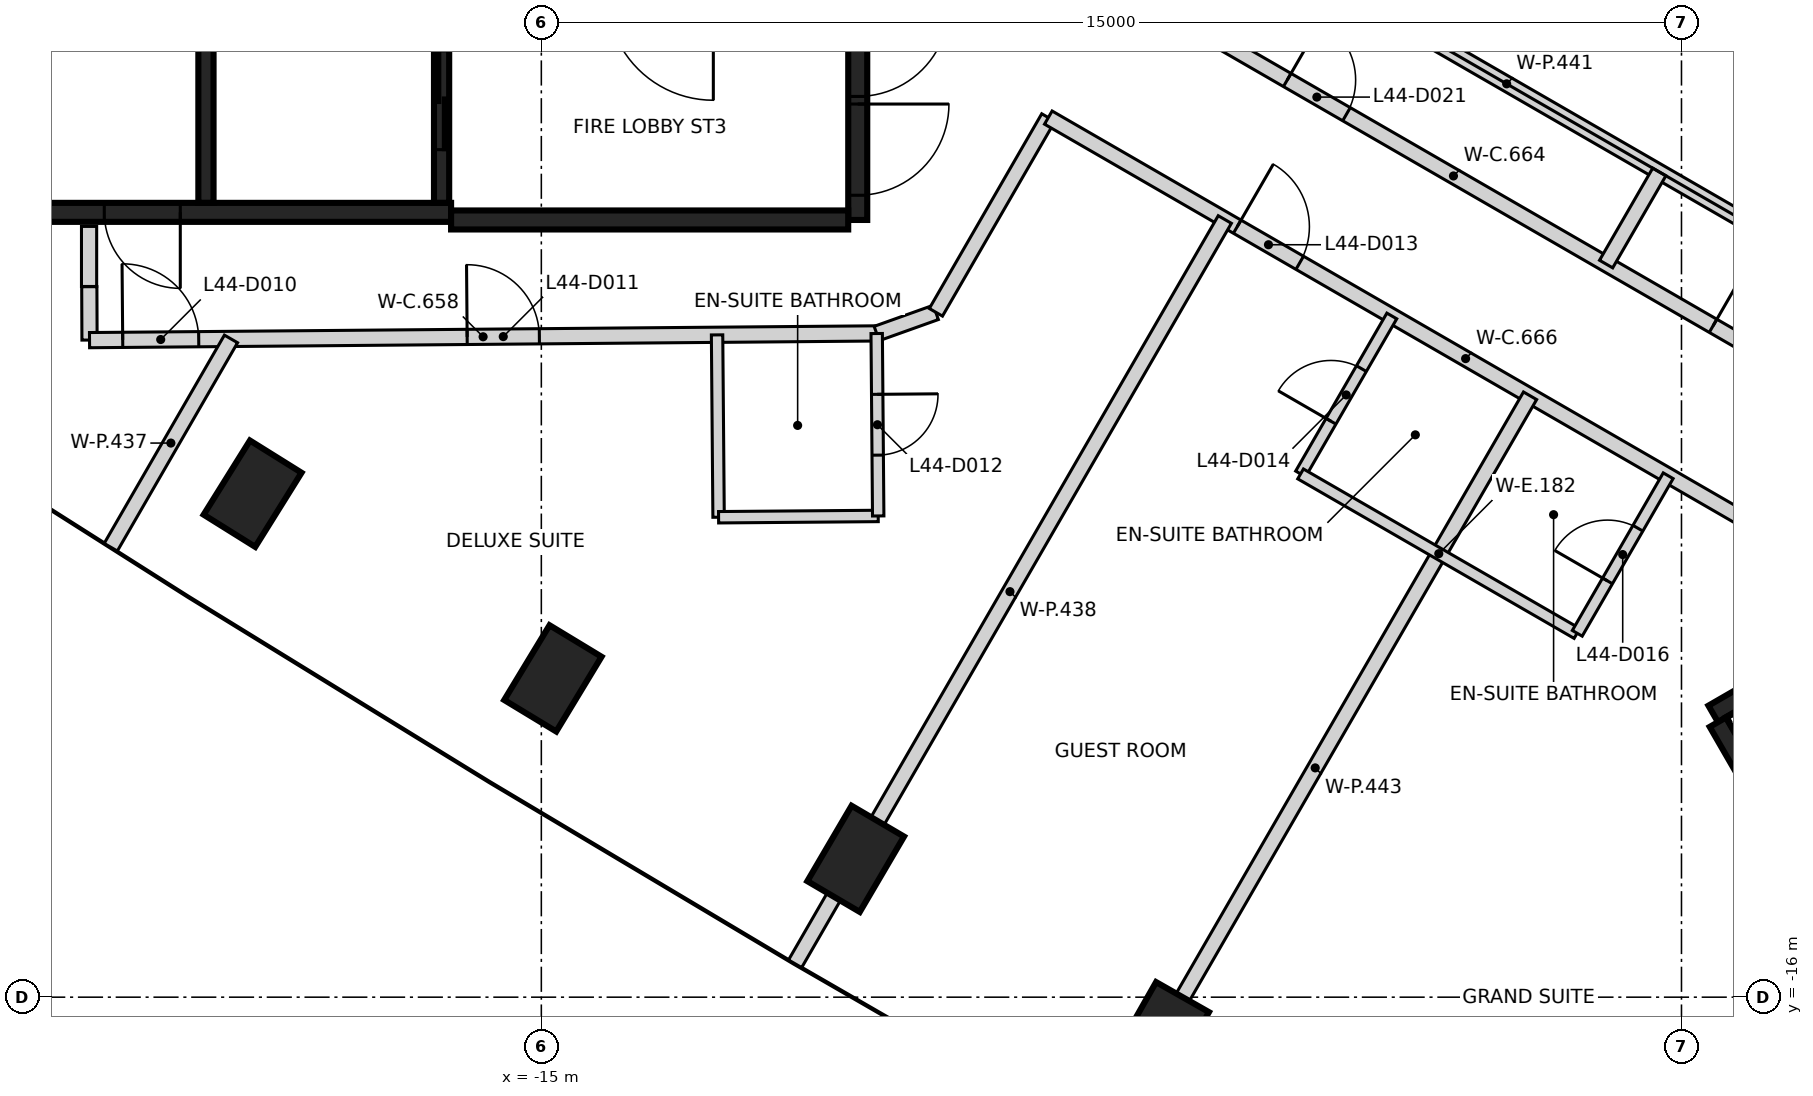
"""IFC4 building model, lengths in metres.
Left out: names, types, materials, properties, quantities, classifications, styles, units other than length and angle.
Written with IfcOpenShell. Run it as: python <this file> out.ifc"""

import sys

from ifc_helpers import new_model, si_unit, direction, frame, frame_2d, origin, origin_2d, place, context, subcontext, project, spatial, rectangle, extrude, element, fill, save


model = new_model("IFC4")
c1 = context("Model", 3, precision=1e-05, world=origin(), true_north=direction((0.0, 1.0)))
c2 = subcontext(c1, "Body", "Model", "MODEL_VIEW")
j1 = project(units=[si_unit("LENGTHUNIT", "METRE"), si_unit("PLANEANGLEUNIT", "RADIAN")], contexts=[c1])
p1 = place(None, origin())
s1 = spatial("IfcSite", under=j1, at=p1, CompositionType="ELEMENT")
p2 = place(p1, origin())
s2 = spatial("IfcBuilding", under=s1, at=p2, CompositionType="ELEMENT")
p3 = place(p2, frame((0.0, 0.0, 179.2)))
s3 = spatial("IfcBuildingStorey", under=s2, at=p3, CompositionType="ELEMENT", Elevation=179.2)
for number, where, z_axis, x_axis in (
    (1, (-18.799, -9.376, -0.35), (0.0, 0.0, 1.0), (0.529, 0.848, 0.0)),
    (2, (-14.848, -11.806, -0.35), (0.0, 0.0, 1.0), (0.518, 0.855, 0.0)),
    (3, (-10.864, -14.18, -0.35), (0.0, 0.0, 1.0), (0.506, 0.862, 0.0)),
    (4, (-6.848, -16.499, -0.35), (0.0, 0.0, 1.0), (0.494, 0.87, 0.0)),
):
    element("IfcColumn", number, at=place(p3, frame(where, z_axis=z_axis, x_axis=x_axis)), inside=s3, PredefinedType="COLUMN", context=c2, shape_type="SweptSolid", body=[
        extrude(rectangle(XDim=1.15, YDim=0.8, at=origin_2d()), origin(), (0.0, 0.0, 1.0), 3.6),
    ])
p4 = place(p3, frame((-10.837, 5.775, 0.0), z_axis=(0.0, 0.0, 1.0), x_axis=(0.0, -1.0, 0.0)))
e5 = element("IfcWall", 5, at=p4, inside=s3, PredefinedType="SHEAR", context=c2, shape_type="SweptSolid", body=[
    extrude(rectangle(XDim=11.55, YDim=0.25, at=frame_2d((5.775, 0.0))), origin(), (0.0, 0.0, 1.0), 3.25),
])
p5 = place(p4, frame((10.025, 0.0, 0.0)))
e6 = element("IfcOpeningElement", 6, at=p5, cuts=e5, PredefinedType="OPENING", context=c2, shape_type="SweptSolid", body=[
    extrude(rectangle(XDim=1.2, YDim=2.1, at=frame_2d((0.6, 1.05))), frame((0.0, 0.135, 0.0), z_axis=(0.0, -1.0, 0.0), x_axis=(1.0, 0.0, 0.0)), (0.0, 0.0, 1.0), 0.27),
])
p6 = place(p4, frame((8.725, 0.0, 0.0)))
e7 = element("IfcOpeningElement", 7, at=p6, cuts=e5, PredefinedType="OPENING", context=c2, shape_type="SweptSolid", body=[
    extrude(rectangle(XDim=1.2, YDim=2.1, at=frame_2d((0.6, 1.05))), frame((0.0, 0.135, 0.0), z_axis=(0.0, -1.0, 0.0), x_axis=(1.0, 0.0, 0.0)), (0.0, 0.0, 1.0), 0.27),
])
p7 = place(p3, frame((-16.187, -5.675, 0.0), z_axis=(0.0, 0.0, 1.0), x_axis=(-1.0, 0.0, 0.0)))
e8 = element("IfcWall", 8, at=p7, inside=s3, PredefinedType="SHEAR", context=c2, shape_type="SweptSolid", body=[
    extrude(rectangle(XDim=6.25, YDim=0.25, at=frame_2d((3.125, 0.0))), origin(), (0.0, 0.0, 1.0), 3.25),
])
p8 = place(p7, frame((3.563, 0.0, 0.0)))
e9 = element("IfcOpeningElement", 9, at=p8, cuts=e8, PredefinedType="OPENING", context=c2, shape_type="SweptSolid", body=[
    extrude(rectangle(XDim=1.0, YDim=2.1, at=frame_2d((0.5, 1.05))), frame((0.0, 0.135, 0.0), z_axis=(0.0, -1.0, 0.0), x_axis=(1.0, 0.0, 0.0)), (0.0, 0.0, 1.0), 0.27),
])
p9 = place(p3, frame((-10.963, -5.775, 0.0), z_axis=(0.0, 0.0, 1.0), x_axis=(-1.0, 0.0, 0.0)))
e10 = element("IfcWall", 10, at=p9, inside=s3, PredefinedType="SHEAR", context=c2, shape_type="SweptSolid", body=[
    extrude(rectangle(XDim=5.225, YDim=0.25, at=frame_2d((2.612, 0.0))), origin(), (0.0, 0.0, 1.0), 3.25),
])
p10 = place(p3, frame((-16.312, -2.898, 0.0), z_axis=(0.0, 0.0, 1.0), x_axis=(0.0, -1.0, 0.0)))
e11 = element("IfcWall", 11, at=p10, inside=s3, PredefinedType="SHEAR", context=c2, shape_type="SweptSolid", body=[
    extrude(rectangle(XDim=2.651, YDim=0.2, at=frame_2d((1.325, 0.0))), origin(), (0.0, 0.0, 1.0), 3.25),
])
p11 = place(p10, frame((0.652, 0.0, 0.0)))
e12 = element("IfcOpeningElement", 12, at=p11, cuts=e11, PredefinedType="OPENING", context=c2, shape_type="SweptSolid", body=[
    extrude(rectangle(XDim=1.3, YDim=2.1, at=frame_2d((0.65, 1.05))), frame((0.0, 0.11, 0.0), z_axis=(0.0, -1.0, 0.0), x_axis=(1.0, 0.0, 0.0)), (0.0, 0.0, 1.0), 0.22),
])
p12 = place(p3, frame((-19.412, -5.549, 0.0), z_axis=(0.0, 0.0, 1.0), x_axis=(0.0, 1.0, 0.0)))
e13 = element("IfcWall", 13, at=p12, inside=s3, PredefinedType="SHEAR", context=c2, shape_type="SweptSolid", body=[
    extrude(rectangle(XDim=2.651, YDim=0.2, at=frame_2d((1.325, 0.0))), origin(), (0.0, 0.0, 1.0), 3.25),
])
p13 = place(p3, frame((0.417, -12.273, 0.0), z_axis=(0.0, 0.0, 1.0), x_axis=(0.866021906294, 0.500006057782, 0.0)))
e14 = element("IfcWall", 14, at=p13, inside=s3, PredefinedType="SHEAR", context=c2, shape_type="SweptSolid", body=[
    extrude(rectangle(XDim=11.55, YDim=0.25, at=frame_2d((5.775, 0.0))), origin(), (0.0, 0.0, 1.0), 3.25),
])
p14 = place(p13, frame((10.025, 0.0, 0.0)))
e15 = element("IfcOpeningElement", 15, at=p14, cuts=e14, PredefinedType="OPENING", context=c2, shape_type="SweptSolid", body=[
    extrude(rectangle(XDim=1.2, YDim=2.1, at=frame_2d((0.6, 1.05))), frame((0.0, 0.135, 0.0), z_axis=(0.0, -1.0, 0.0), x_axis=(1.0, 0.0, 0.0)), (0.0, 0.0, 1.0), 0.27),
])
p15 = place(p13, frame((8.725, 0.0, 0.0)))
e16 = element("IfcOpeningElement", 16, at=p15, cuts=e14, PredefinedType="OPENING", context=c2, shape_type="SweptSolid", body=[
    extrude(rectangle(XDim=1.2, YDim=2.1, at=frame_2d((0.6, 1.05))), frame((0.0, 0.135, 0.0), z_axis=(0.0, -1.0, 0.0), x_axis=(1.0, 0.0, 0.0)), (0.0, 0.0, 1.0), 0.27),
])
p16 = place(p3, frame((3.235, -17.153, 0.0), z_axis=(0.0, 0.0, 1.0), x_axis=(-0.500008851346, 0.866020293397, 0.0)))
e17 = element("IfcWall", 17, at=p16, inside=s3, PredefinedType="SHEAR", context=c2, shape_type="SweptSolid", body=[
    extrude(rectangle(XDim=5.51, YDim=0.25, at=frame_2d((2.755, 0.0))), origin(), (0.0, 0.0, 1.0), 3.25),
])
p17 = place(p3, frame((-20.95, -6.65, 0.0), z_axis=(0.0, 0.0, 1.0), x_axis=(0.0, 1.0, 0.0)))
e18 = element("IfcWall", 18, at=p17, inside=s3, PredefinedType="PARTITIONING", context=c2, shape_type="SweptSolid", body=[
    extrude(rectangle(XDim=0.79, YDim=0.2, at=frame_2d((0.395, 0.0))), origin(), (0.0, 0.0, 1.0), 3.25),
])
p18 = place(p3, frame((-20.947, -6.653, 0.0), z_axis=(0.0, 0.0, 1.0), x_axis=(0.004173876686, -0.999991289339, 0.0)))
e19 = element("IfcWall", 19, at=p18, inside=s3, PredefinedType="PARTITIONING", context=c2, shape_type="SweptSolid", body=[
    extrude(rectangle(XDim=0.702, YDim=0.2, at=frame_2d((0.351, 0.0))), origin(), (0.0, 0.0, 1.0), 3.25),
])
p19 = place(p3, frame((-20.944, -7.356, 0.0), z_axis=(0.0, 0.0, 1.0), x_axis=(0.999963588164, 0.008533600955, 0.0)))
e20 = element("IfcWall", 20, at=p19, inside=s3, PredefinedType="PARTITIONING", context=c2, shape_type="SweptSolid", body=[
    extrude(rectangle(XDim=10.357, YDim=0.2, at=frame_2d((5.178, 0.0))), origin(), (0.0, 0.0, 1.0), 3.25),
])
p20 = place(p19, frame((0.437, 0.0, 0.0)))
e21 = element("IfcOpeningElement", 21, at=p20, cuts=e20, PredefinedType="OPENING", context=c2, shape_type="SweptSolid", body=[
    extrude(rectangle(XDim=1.0, YDim=2.1, at=frame_2d((0.5, 1.05))), frame((0.0, 0.11, 0.0), z_axis=(0.0, -1.0, 0.0), x_axis=(1.0, 0.0, 0.0)), (0.0, 0.0, 1.0), 0.22),
])
p21 = place(p19, frame((4.968, 0.0, 0.0)))
e22 = element("IfcOpeningElement", 22, at=p21, cuts=e20, PredefinedType="OPENING", context=c2, shape_type="SweptSolid", body=[
    extrude(rectangle(XDim=0.95, YDim=2.1, at=frame_2d((0.475, 1.05))), frame((0.0, 0.11, 0.0), z_axis=(0.0, -1.0, 0.0), x_axis=(1.0, 0.0, 0.0)), (0.0, 0.0, 1.0), 0.22),
])
p22 = place(p3, frame((-10.588, -7.269, 0.0), z_axis=(0.0, 0.0, 1.0), x_axis=(0.941634876095, 0.336635945974, 0.0)))
e23 = element("IfcWall", 23, at=p22, inside=s3, PredefinedType="PARTITIONING", context=c2, shape_type="SweptSolid", body=[
    extrude(rectangle(XDim=0.826, YDim=0.2, at=frame_2d((0.413, 0.0))), origin(), (0.0, 0.0, 1.0), 3.25),
])
p23 = place(p3, frame((-9.809, -6.99, 0.0), z_axis=(0.0, 0.0, 1.0), x_axis=(0.499955822529, 0.866050908157, 0.0)))
e24 = element("IfcWall", 24, at=p23, inside=s3, PredefinedType="PARTITIONING", context=c2, shape_type="SweptSolid", body=[
    extrude(rectangle(XDim=2.958, YDim=0.2, at=frame_2d((1.479, 0.0))), origin(), (0.0, 0.0, 1.0), 3.25),
])
p24 = place(p3, frame((-8.612, -1.956, 0.0), z_axis=(0.0, 0.0, 1.0), x_axis=(0.866034386606, -0.499984440973, 0.0)))
e25 = element("IfcWall", 25, at=p24, inside=s3, PredefinedType="PARTITIONING", context=c2, shape_type="SweptSolid", body=[
    extrude(rectangle(XDim=12.96, YDim=0.2, at=frame_2d((6.48, 0.0))), origin(), (0.0, 0.0, 1.0), 3.25),
])
p25 = place(p24, frame((3.955, 0.0, 0.0)))
e26 = element("IfcOpeningElement", 26, at=p25, cuts=e25, PredefinedType="OPENING", context=c2, shape_type="SweptSolid", body=[
    extrude(rectangle(XDim=0.9, YDim=2.1, at=frame_2d((0.45, 1.05))), frame((0.0, 0.11, 0.0), z_axis=(0.0, -1.0, 0.0), x_axis=(1.0, 0.0, 0.0)), (0.0, 0.0, 1.0), 0.22),
])
p26 = place(p24, frame((10.424, 0.0, 0.0)))
e27 = element("IfcOpeningElement", 27, at=p26, cuts=e25, PredefinedType="OPENING", context=c2, shape_type="SweptSolid", body=[
    extrude(rectangle(XDim=0.9, YDim=2.1, at=frame_2d((0.45, 1.05))), frame((0.0, 0.11, 0.0), z_axis=(0.0, -1.0, 0.0), x_axis=(1.0, 0.0, 0.0)), (0.0, 0.0, 1.0), 0.22),
])
p27 = place(p3, frame((-8.33, -4.428, 0.0), z_axis=(0.0, 0.0, 1.0), x_axis=(0.865923263811, -0.500176869909, 0.0)))
e28 = element("IfcWall", 28, at=p27, inside=s3, PredefinedType="PARTITIONING", context=c2, shape_type="SweptSolid", body=[
    extrude(rectangle(XDim=12.68, YDim=0.2, at=frame_2d((6.34, 0.0))), origin(), (0.0, 0.0, 1.0), 3.25),
])
p28 = place(p27, frame((2.87, 0.0, 0.0)))
e29 = element("IfcOpeningElement", 29, at=p28, cuts=e28, PredefinedType="OPENING", context=c2, shape_type="SweptSolid", body=[
    extrude(rectangle(XDim=0.95, YDim=2.1, at=frame_2d((0.475, 1.05))), frame((0.0, 0.11, 0.0), z_axis=(0.0, -1.0, 0.0), x_axis=(1.0, 0.0, 0.0)), (0.0, 0.0, 1.0), 0.22),
])
p29 = place(p27, frame((11.5, 0.0, 0.0)))
e30 = element("IfcOpeningElement", 30, at=p29, cuts=e28, PredefinedType="OPENING", context=c2, shape_type="SweptSolid", body=[
    extrude(rectangle(XDim=0.95, YDim=2.1, at=frame_2d((0.475, 1.05))), frame((0.0, 0.11, 0.0), z_axis=(0.0, -1.0, 0.0), x_axis=(1.0, 0.0, 0.0)), (0.0, 0.0, 1.0), 0.22),
])
p30 = place(p3, frame((-20.665, -10.08, 0.0), z_axis=(0.0, 0.0, 1.0), x_axis=(0.499931743679, 0.866064808003, 0.0)))
e31 = element("IfcWall", 31, at=p30, inside=s3, PredefinedType="PARTITIONING", context=c2, shape_type="SweptSolid", body=[
    extrude(rectangle(XDim=3.164, YDim=0.2, at=frame_2d((1.582, 0.0))), origin(), (0.0, 0.0, 1.0), 2.35),
])
p31 = place(p3, frame((-11.661, -15.561, 0.0), z_axis=(0.0, 0.0, 1.0), x_axis=(0.500012795616, 0.866018016106, 0.0)))
e32 = element("IfcWall", 32, at=p31, inside=s3, PredefinedType="PARTITIONING", context=c2, shape_type="SweptSolid", body=[
    extrude(rectangle(XDim=11.306, YDim=0.2, at=frame_2d((5.653, 0.0))), origin(), (0.0, 0.0, 1.0), 3.25),
])
p32 = place(p3, frame((-7.6, -0.924, 0.0), z_axis=(0.0, 0.0, 1.0), x_axis=(0.866028806638, -0.499994106039, 0.0)))
e33 = element("IfcWall", 33, at=p32, inside=s3, PredefinedType="PARTITIONING", context=c2, shape_type="SweptSolid", body=[
    extrude(rectangle(XDim=12.24, YDim=0.2, at=frame_2d((6.12, 0.0))), origin(), (0.0, 0.0, 1.0), 3.25),
])
p33 = place(p3, frame((-7.646, -17.879, 0.0), z_axis=(0.0, 0.0, 1.0), x_axis=(0.500031496802, 0.866007218334, 0.0)))
e34 = element("IfcWall", 34, at=p33, inside=s3, PredefinedType="PARTITIONING", context=c2, shape_type="SweptSolid", body=[
    extrude(rectangle(XDim=11.306, YDim=0.2, at=frame_2d((5.653, 0.0))), origin(), (0.0, 0.0, 1.0), 3.25),
])
p34 = place(p3, frame((-0.992, -6.355, 0.0), z_axis=(0.0, 0.0, 1.0), x_axis=(0.500059638837, 0.865990968548, 0.0)))
e35 = element("IfcWall", 35, at=p34, inside=s3, PredefinedType="PARTITIONING", context=c2, shape_type="SweptSolid", body=[
    extrude(rectangle(XDim=1.4, YDim=0.2, at=frame_2d((0.7, 0.0))), origin(), (0.0, 0.0, 1.0), 3.25),
])
p35 = place(p3, frame((-12.688, -7.287, 0.0), z_axis=(0.0, 0.0, 1.0), x_axis=(0.00834491602, -0.999965180582, 0.0)))
e36 = element("IfcWall", 36, at=p35, inside=s3, PredefinedType="PARTITIONING", context=c2, shape_type="SweptSolid", body=[
    extrude(rectangle(XDim=2.399, YDim=0.15, at=frame_2d((1.199, 0.0))), origin(), (0.0, 0.0, 1.0), 3.25),
])
p36 = place(p3, frame((-12.668, -9.686, 0.0), z_axis=(0.0, 0.0, 1.0), x_axis=(0.999966883333, 0.008138319013, 0.0)))
e37 = element("IfcWall", 37, at=p36, inside=s3, PredefinedType="PARTITIONING", context=c2, shape_type="SweptSolid", body=[
    extrude(rectangle(XDim=2.1, YDim=0.15, at=frame_2d((1.05, 0.0))), origin(), (0.0, 0.0, 1.0), 3.25),
])
p37 = place(p3, frame((-10.588, -7.269, 0.0), z_axis=(0.0, 0.0, 1.0), x_axis=(0.008239801651, -0.999966052258, 0.0)))
e38 = element("IfcWall", 38, at=p37, inside=s3, PredefinedType="PARTITIONING", context=c2, shape_type="SweptSolid", body=[
    extrude(rectangle(XDim=2.4, YDim=0.15, at=frame_2d((1.2, 0.0))), origin(), (0.0, 0.0, 1.0), 3.25),
])
p38 = place(p37, frame((0.8, 0.0, 0.0)))
e39 = element("IfcOpeningElement", 39, at=p38, cuts=e38, PredefinedType="OPENING", context=c2, shape_type="SweptSolid", body=[
    extrude(rectangle(XDim=0.8, YDim=2.1, at=frame_2d((0.4, 1.05))), frame((0.0, 0.085, 0.0), z_axis=(0.0, -1.0, 0.0), x_axis=(1.0, 0.0, 0.0)), (0.0, 0.0, 1.0), 0.17),
])
p39 = place(p3, frame((-5.011, -9.116, 0.0), z_axis=(0.0, 0.0, 1.0), x_axis=(0.500089422704, 0.865973769406, 0.0)))
e40 = element("IfcWall", 40, at=p39, inside=s3, PredefinedType="PARTITIONING", context=c2, shape_type="SweptSolid", body=[
    extrude(rectangle(XDim=2.399, YDim=0.15, at=frame_2d((1.2, 0.0))), origin(), (0.0, 0.0, 1.0), 3.25),
])
p40 = place(p39, frame((0.8, 0.0, 0.0)))
e41 = element("IfcOpeningElement", 41, at=p40, cuts=e40, PredefinedType="OPENING", context=c2, shape_type="SweptSolid", body=[
    extrude(rectangle(XDim=0.8, YDim=2.1, at=frame_2d((0.4, 1.05))), frame((0.0, 0.085, 0.0), z_axis=(0.0, -1.0, 0.0), x_axis=(1.0, 0.0, 0.0)), (0.0, 0.0, 1.0), 0.17),
])
p41 = place(p3, frame((-5.011, -9.116, 0.0), z_axis=(0.0, 0.0, 1.0), x_axis=(0.866062607352, -0.499935555993, 0.0)))
e42 = element("IfcWall", 42, at=p41, inside=s3, PredefinedType="PARTITIONING", context=c2, shape_type="SweptSolid", body=[
    extrude(rectangle(XDim=4.198, YDim=0.15, at=frame_2d((2.099, 0.0))), origin(), (0.0, 0.0, 1.0), 3.25),
])
p42 = place(p3, frame((-1.371, -11.213, 0.0), z_axis=(0.0, 0.0, 1.0), x_axis=(0.499748946523, 0.866170301066, 0.0)))
e43 = element("IfcWall", 43, at=p42, inside=s3, PredefinedType="PARTITIONING", context=c2, shape_type="SweptSolid", body=[
    extrude(rectangle(XDim=2.393, YDim=0.15, at=frame_2d((1.197, 0.0))), origin(), (0.0, 0.0, 1.0), 3.25),
])
p43 = place(p42, frame((0.796, 0.0, 0.0)))
e44 = element("IfcOpeningElement", 44, at=p43, cuts=e43, PredefinedType="OPENING", context=c2, shape_type="SweptSolid", body=[
    extrude(rectangle(XDim=0.8, YDim=2.1, at=frame_2d((0.4, 1.05))), frame((0.0, 0.085, 0.0), z_axis=(0.0, -1.0, 0.0), x_axis=(1.0, 0.0, 0.0)), (0.0, 0.0, 1.0), 0.17),
])
p44 = place(p11, origin())
e45 = element("IfcDoor", 45, at=p44, inside=s3, OperationType="SLIDING_TO_LEFT", PredefinedType="DOOR", context=c2, shape_type="SweptSolid", body=[
    extrude(rectangle(XDim=1.3, YDim=2.1, at=frame_2d((0.65, 1.05))), frame((0.0, 0.025, 0.0), z_axis=(0.0, -1.0, 0.0), x_axis=(1.0, 0.0, 0.0)), (0.0, 0.0, 1.0), 0.05),
])
fill(e12, e45)
p45 = place(p8, origin())
e46 = element("IfcDoor", 46, at=p45, inside=s3, OperationType="SINGLE_SWING_LEFT", PredefinedType="DOOR", context=c2, shape_type="SweptSolid", body=[
    extrude(rectangle(XDim=1.0, YDim=2.1, at=frame_2d((0.5, 1.05))), frame((0.0, 0.025, 0.0), z_axis=(0.0, -1.0, 0.0), x_axis=(1.0, 0.0, 0.0)), (0.0, 0.0, 1.0), 0.05),
])
fill(e9, e46)
p46 = place(p5, origin())
e47 = element("IfcDoor", 47, at=p46, inside=s3, OperationType="SINGLE_SWING_LEFT", PredefinedType="DOOR", context=c2, shape_type="SweptSolid", body=[
    extrude(rectangle(XDim=1.2, YDim=2.1, at=frame_2d((0.6, 1.05))), frame((0.0, 0.025, 0.0), z_axis=(0.0, -1.0, 0.0), x_axis=(1.0, 0.0, 0.0)), (0.0, 0.0, 1.0), 0.05),
])
fill(e6, e47)
p47 = place(p6, origin())
e48 = element("IfcDoor", 48, at=p47, inside=s3, OperationType="SINGLE_SWING_RIGHT", PredefinedType="DOOR", context=c2, shape_type="SweptSolid", body=[
    extrude(rectangle(XDim=1.2, YDim=2.1, at=frame_2d((0.6, 1.05))), frame((0.0, 0.025, 0.0), z_axis=(0.0, -1.0, 0.0), x_axis=(1.0, 0.0, 0.0)), (0.0, 0.0, 1.0), 0.05),
])
fill(e7, e48)
p48 = place(p20, origin())
e49 = element("IfcDoor", 49, at=p48, inside=s3, OperationType="SINGLE_SWING_LEFT", PredefinedType="DOOR", context=c2, shape_type="SweptSolid", body=[
    extrude(rectangle(XDim=1.0, YDim=2.1, at=frame_2d((0.5, 1.05))), frame((0.0, 0.025, 0.0), z_axis=(0.0, -1.0, 0.0), x_axis=(1.0, 0.0, 0.0)), (0.0, 0.0, 1.0), 0.05),
])
fill(e21, e49)
p49 = place(p21, frame((0.95, 0.0, 0.0), z_axis=(0.0, 0.0, 1.0), x_axis=(-1.0, 0.0, 0.0)))
e50 = element("IfcDoor", 50, at=p49, inside=s3, OperationType="SINGLE_SWING_LEFT", PredefinedType="DOOR", context=c2, shape_type="SweptSolid", body=[
    extrude(rectangle(XDim=0.95, YDim=2.1, at=frame_2d((0.475, 1.05))), frame((0.0, 0.025, 0.0), z_axis=(0.0, -1.0, 0.0), x_axis=(1.0, 0.0, 0.0)), (0.0, 0.0, 1.0), 0.05),
])
fill(e22, e50)
p50 = place(p38, frame((0.8, 0.0, 0.0), z_axis=(0.0, 0.0, 1.0), x_axis=(-1.0, 0.0, 0.0)))
e51 = element("IfcDoor", 51, at=p50, inside=s3, OperationType="SINGLE_SWING_LEFT", PredefinedType="DOOR", context=c2, shape_type="SweptSolid", body=[
    extrude(rectangle(XDim=0.8, YDim=2.1, at=frame_2d((0.4, 1.05))), frame((0.0, 0.025, 0.0), z_axis=(0.0, -1.0, 0.0), x_axis=(1.0, 0.0, 0.0)), (0.0, 0.0, 1.0), 0.05),
])
fill(e39, e51)
p51 = place(p28, frame((0.95, 0.0, 0.0), z_axis=(0.0, 0.0, 1.0), x_axis=(-1.0, 0.0, 0.0)))
e52 = element("IfcDoor", 52, at=p51, inside=s3, OperationType="SINGLE_SWING_LEFT", PredefinedType="DOOR", context=c2, shape_type="SweptSolid", body=[
    extrude(rectangle(XDim=0.95, YDim=2.1, at=frame_2d((0.475, 1.05))), frame((0.0, 0.025, 0.0), z_axis=(0.0, -1.0, 0.0), x_axis=(1.0, 0.0, 0.0)), (0.0, 0.0, 1.0), 0.05),
])
fill(e29, e52)
p52 = place(p40, origin())
e53 = element("IfcDoor", 53, at=p52, inside=s3, OperationType="SINGLE_SWING_LEFT", PredefinedType="DOOR", context=c2, shape_type="SweptSolid", body=[
    extrude(rectangle(XDim=0.8, YDim=2.1, at=frame_2d((0.4, 1.05))), frame((0.0, 0.025, 0.0), z_axis=(0.0, -1.0, 0.0), x_axis=(1.0, 0.0, 0.0)), (0.0, 0.0, 1.0), 0.05),
])
fill(e41, e53)
p53 = place(p43, frame((0.8, 0.0, 0.0), z_axis=(0.0, 0.0, 1.0), x_axis=(-1.0, 0.0, 0.0)))
e54 = element("IfcDoor", 54, at=p53, inside=s3, OperationType="SINGLE_SWING_LEFT", PredefinedType="DOOR", context=c2, shape_type="SweptSolid", body=[
    extrude(rectangle(XDim=0.8, YDim=2.1, at=frame_2d((0.4, 1.05))), frame((0.0, 0.025, 0.0), z_axis=(0.0, -1.0, 0.0), x_axis=(1.0, 0.0, 0.0)), (0.0, 0.0, 1.0), 0.05),
])
fill(e44, e54)
p54 = place(p25, origin())
e55 = element("IfcDoor", 55, at=p54, inside=s3, OperationType="SINGLE_SWING_LEFT", PredefinedType="DOOR", context=c2, shape_type="SweptSolid", body=[
    extrude(rectangle(XDim=0.9, YDim=2.1, at=frame_2d((0.45, 1.05))), frame((0.0, 0.025, 0.0), z_axis=(0.0, -1.0, 0.0), x_axis=(1.0, 0.0, 0.0)), (0.0, 0.0, 1.0), 0.05),
])
fill(e26, e55)
p55 = place(p26, origin())
e56 = element("IfcDoor", 56, at=p55, inside=s3, OperationType="SINGLE_SWING_LEFT", PredefinedType="DOOR", context=c2, shape_type="SweptSolid", body=[
    extrude(rectangle(XDim=0.9, YDim=2.1, at=frame_2d((0.45, 1.05))), frame((0.0, 0.025, 0.0), z_axis=(0.0, -1.0, 0.0), x_axis=(1.0, 0.0, 0.0)), (0.0, 0.0, 1.0), 0.05),
])
fill(e27, e56)
save(model, sys.argv[1])
